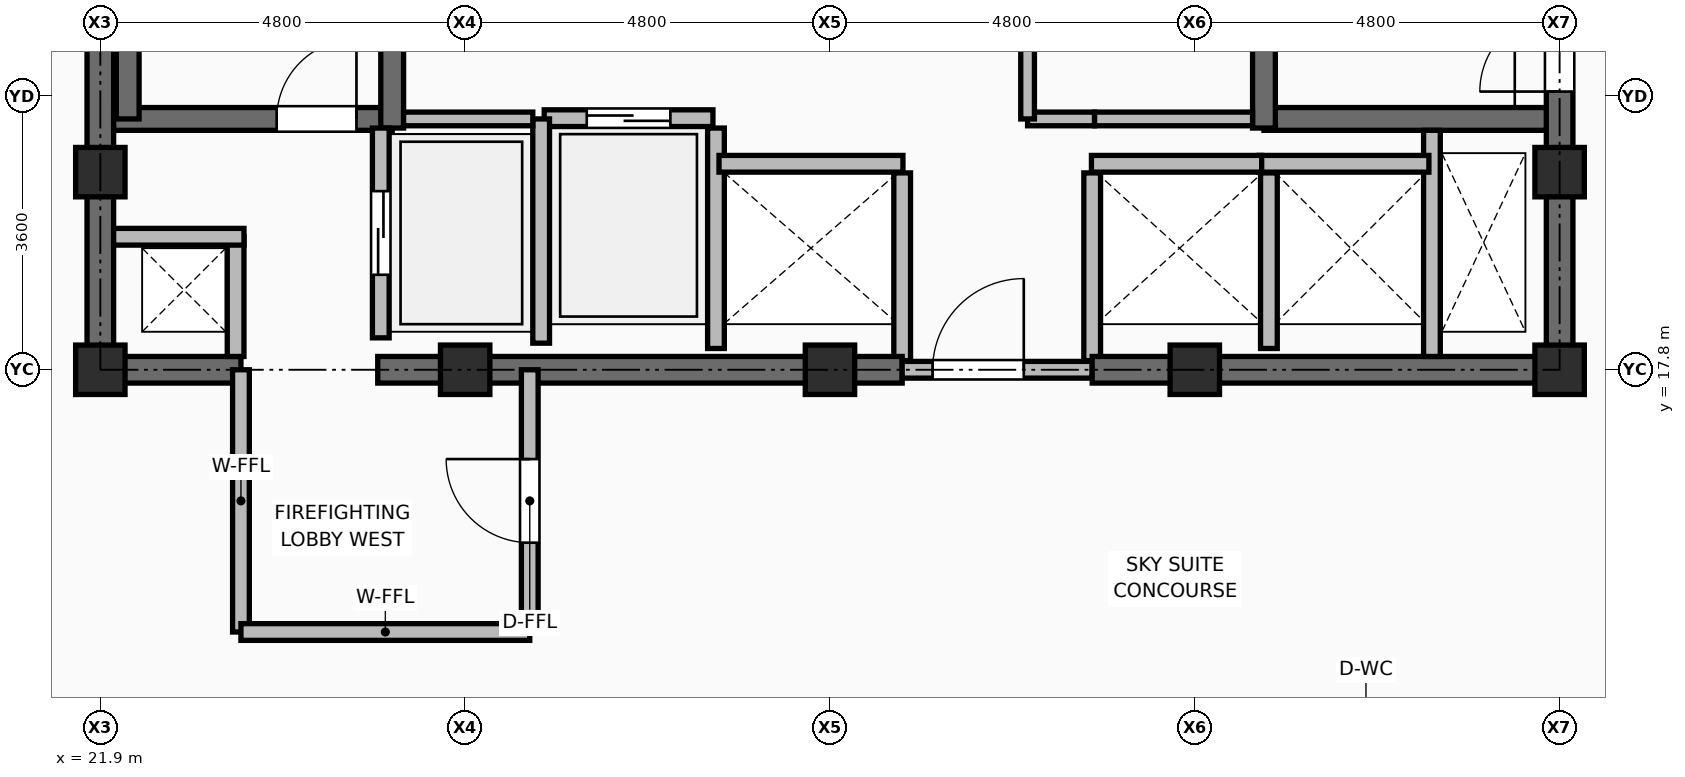
"""IFC4 building model, lengths in metres.
Left out: names, types, materials, properties, quantities, classifications, styles, units other than length and angle.
Written with IfcOpenShell. Run it as: python <this file> out.ifc"""

import sys

from ifc_helpers import new_model, si_unit, direction, frame, frame_2d, origin, origin_2d, place, context, subcontext, project, spatial, rectangle, extrude, element, fill, save


model = new_model("IFC4")
c1 = context("Model", 3, precision=1e-05, world=origin(), true_north=direction((0.0, 1.0)))
c2 = subcontext(c1, "Body", "Model", "MODEL_VIEW")
j1 = project(units=[si_unit("LENGTHUNIT", "METRE"), si_unit("PLANEANGLEUNIT", "RADIAN")], contexts=[c1])
p1 = place(None, origin())
s1 = spatial("IfcSite", under=j1, at=p1, CompositionType="ELEMENT")
p2 = place(p1, origin())
s2 = spatial("IfcBuilding", under=s1, at=p2, CompositionType="ELEMENT")
p3 = place(p2, frame((0.0, 0.0, 259.05)))
s3 = spatial("IfcBuildingStorey", under=s2, at=p3, CompositionType="ELEMENT", Elevation=259.05)
for number, where, z_axis, x_axis in (
    (1, (21.9, 17.8, 0.0), (0.0, 0.0, 1.0), (1.0, 0.0, 0.0)),
    (2, (26.7, 17.8, 0.0), (0.0, 0.0, 1.0), (1.0, 0.0, 0.0)),
    (3, (31.5, 17.8, 0.0), (0.0, 0.0, 1.0), (1.0, 0.0, 0.0)),
    (4, (36.3, 17.8, 0.0), (0.0, 0.0, 1.0), (1.0, 0.0, 0.0)),
    (5, (41.1, 17.8, 0.0), (0.0, 0.0, 1.0), (1.0, 0.0, 0.0)),
    (6, (21.9, 20.4, 0.0), (0.0, 0.0, 1.0), (1.0, 0.0, 0.0)),
    (7, (41.1, 20.4, 0.0), (0.0, 0.0, 1.0), (1.0, 0.0, 0.0)),
):
    element("IfcColumn", number, at=place(p3, frame(where, z_axis=z_axis, x_axis=x_axis)), inside=s3, PredefinedType="COLUMN", context=c2, shape_type="SweptSolid", body=[
        extrude(rectangle(XDim=0.65, YDim=0.65, at=origin_2d()), origin(), (0.0, 0.0, 1.0), 4.8),
    ])
p4 = place(p3, frame((30.0, 18.08, 0.0), z_axis=(0.0, 0.0, 1.0), x_axis=(0.0, 1.0, 0.0)))
e8 = element("IfcWall", 8, at=p4, inside=s3, PredefinedType="PARTITIONING", context=c2, shape_type="SweptSolid", body=[
    extrude(rectangle(XDim=2.9, YDim=0.22, at=frame_2d((1.45, 0.0))), origin(), (0.0, 0.0, 1.0), 4.595),
])
for number, where, z_axis, x_axis in (
    (9, (32.45, 17.92, 0.0), (0.0, 0.0, 1.0), (0.0, 1.0, 0.0)),
    (10, (34.95, 17.92, 0.0), (0.0, 0.0, 1.0), (0.0, 1.0, 0.0)),
):
    element("IfcWall", number, at=place(p3, frame(where, z_axis=z_axis, x_axis=x_axis)), inside=s3, PredefinedType="PARTITIONING", context=c2, shape_type="SweptSolid", body=[
        extrude(rectangle(XDim=2.47, YDim=0.22, at=frame_2d((1.235, 0.0))), origin(), (0.0, 0.0, 1.0), 4.595),
    ])
p5 = place(p3, frame((37.275, 18.08, 0.0), z_axis=(0.0, 0.0, 1.0), x_axis=(0.0, 1.0, 0.0)))
e11 = element("IfcWall", 11, at=p5, inside=s3, PredefinedType="PARTITIONING", context=c2, shape_type="SweptSolid", body=[
    extrude(rectangle(XDim=2.31, YDim=0.22, at=frame_2d((1.155, 0.0))), origin(), (0.0, 0.0, 1.0), 4.595),
])
p6 = place(p3, frame((21.725, 17.8, 0.0), z_axis=(0.0, 0.0, 1.0), x_axis=(1.0, 0.0, 0.0)))
e12 = element("IfcWall", 12, at=p6, inside=s3, PredefinedType="SHEAR", context=c2, shape_type="SweptSolid", body=[
    extrude(rectangle(XDim=2.025, YDim=0.35, at=frame_2d((1.012, 0.0))), origin(), (0.0, 0.0, 1.0), 4.62),
])
p7 = place(p3, frame((25.55, 17.8, 0.0), z_axis=(0.0, 0.0, 1.0), x_axis=(1.0, 0.0, 0.0)))
e13 = element("IfcWall", 13, at=p7, inside=s3, PredefinedType="SHEAR", context=c2, shape_type="SweptSolid", body=[
    extrude(rectangle(XDim=6.9, YDim=0.35, at=frame_2d((3.45, 0.0))), origin(), (0.0, 0.0, 1.0), 4.62),
])
p8 = place(p3, frame((32.45, 17.8, 0.0), z_axis=(0.0, 0.0, 1.0), x_axis=(1.0, 0.0, 0.0)))
e14 = element("IfcWall", 14, at=p8, inside=s3, PredefinedType="PARTITIONING", context=c2, shape_type="SweptSolid", body=[
    extrude(rectangle(XDim=2.5, YDim=0.22, at=frame_2d((1.25, 0.0))), origin(), (0.0, 0.0, 1.0), 4.182),
])
p9 = place(p8, frame((0.4, 0.0, 0.0)))
e15 = element("IfcOpeningElement", 15, at=p9, cuts=e14, PredefinedType="OPENING", context=c2, shape_type="SweptSolid", body=[
    extrude(rectangle(XDim=1.2, YDim=2.1, at=frame_2d((0.6, 1.05))), frame((0.0, 0.12, 0.0), z_axis=(0.0, -1.0, 0.0), x_axis=(1.0, 0.0, 0.0)), (0.0, 0.0, 1.0), 0.24),
])
p10 = place(p3, frame((34.95, 17.8, 0.0), z_axis=(0.0, 0.0, 1.0), x_axis=(1.0, 0.0, 0.0)))
e16 = element("IfcWall", 16, at=p10, inside=s3, PredefinedType="SHEAR", context=c2, shape_type="SweptSolid", body=[
    extrude(rectangle(XDim=6.325, YDim=0.35, at=frame_2d((3.163, 0.0))), origin(), (0.0, 0.0, 1.0), 4.62),
])
p11 = place(p3, frame((21.9, 17.975, 0.0), z_axis=(0.0, 0.0, 1.0), x_axis=(0.0, 1.0, 0.0)))
e17 = element("IfcWall", 17, at=p11, inside=s3, PredefinedType="SHEAR", context=c2, shape_type="SweptSolid", body=[
    extrude(rectangle(XDim=14.3, YDim=0.35, at=frame_2d((7.15, 0.0))), origin(), (0.0, 0.0, 1.0), 4.62),
])
p12 = place(p3, frame((41.1, 17.975, 0.0), z_axis=(0.0, 0.0, 1.0), x_axis=(0.0, 1.0, 0.0)))
e18 = element("IfcWall", 18, at=p12, inside=s3, PredefinedType="SHEAR", context=c2, shape_type="SweptSolid", body=[
    extrude(rectangle(XDim=14.3, YDim=0.35, at=frame_2d((7.15, 0.0))), origin(), (0.0, 0.0, 1.0), 4.62),
])
p13 = place(p12, frame((3.485, 0.0, 0.0)))
e19 = element("IfcOpeningElement", 19, at=p13, cuts=e18, PredefinedType="OPENING", context=c2, shape_type="SweptSolid", body=[
    extrude(rectangle(XDim=1.05, YDim=2.1, at=frame_2d((0.525, 1.05))), frame((0.0, 0.185, 0.0), z_axis=(0.0, -1.0, 0.0), x_axis=(1.0, 0.0, 0.0)), (0.0, 0.0, 1.0), 0.37),
])
p14 = place(p3, frame((22.075, 21.1, 0.0), z_axis=(0.0, 0.0, 1.0), x_axis=(1.0, 0.0, 0.0)))
e20 = element("IfcWall", 20, at=p14, inside=s3, PredefinedType="SHEAR", context=c2, shape_type="SweptSolid", body=[
    extrude(rectangle(XDim=3.665, YDim=0.3, at=frame_2d((1.833, 0.0))), origin(), (0.0, 0.0, 1.0), 4.62),
])
p15 = place(p14, frame((2.145, 0.0, 0.0)))
e21 = element("IfcOpeningElement", 21, at=p15, cuts=e20, PredefinedType="OPENING", context=c2, shape_type="SweptSolid", body=[
    extrude(rectangle(XDim=1.05, YDim=2.1, at=frame_2d((0.525, 1.05))), frame((0.0, 0.16, 0.0), z_axis=(0.0, -1.0, 0.0), x_axis=(1.0, 0.0, 0.0)), (0.0, 0.0, 1.0), 0.32),
])
p16 = place(p3, frame((25.74, 20.98, 0.0), z_axis=(0.0, 0.0, 1.0), x_axis=(0.0, 1.0, 0.0)))
e22 = element("IfcWall", 22, at=p16, inside=s3, PredefinedType="SHEAR", context=c2, shape_type="SweptSolid", body=[
    extrude(rectangle(XDim=7.99, YDim=0.3, at=frame_2d((3.995, 0.0))), origin(), (0.0, 0.0, 1.0), 4.62),
])
p17 = place(p3, frame((22.26, 21.1, 0.0), z_axis=(0.0, 0.0, 1.0), x_axis=(0.0, 1.0, 0.0)))
e23 = element("IfcWall", 23, at=p17, inside=s3, PredefinedType="SHEAR", context=c2, shape_type="SweptSolid", body=[
    extrude(rectangle(XDim=7.75, YDim=0.3, at=frame_2d((3.875, 0.0))), origin(), (0.0, 0.0, 1.0), 4.62),
])
p18 = place(p3, frame((37.21, 21.1, 0.0), z_axis=(0.0, 0.0, 1.0), x_axis=(1.0, 0.0, 0.0)))
e24 = element("IfcWall", 24, at=p18, inside=s3, PredefinedType="SHEAR", context=c2, shape_type="SweptSolid", body=[
    extrude(rectangle(XDim=3.715, YDim=0.3, at=frame_2d((1.857, 0.0))), origin(), (0.0, 0.0, 1.0), 4.62),
])
p19 = place(p3, frame((37.21, 20.98, 0.0), z_axis=(0.0, 0.0, 1.0), x_axis=(0.0, 1.0, 0.0)))
e25 = element("IfcWall", 25, at=p19, inside=s3, PredefinedType="SHEAR", context=c2, shape_type="SweptSolid", body=[
    extrude(rectangle(XDim=7.99, YDim=0.3, at=frame_2d((3.995, 0.0))), origin(), (0.0, 0.0, 1.0), 4.62),
])
p20 = place(p3, frame((23.68, 17.975, 0.0), z_axis=(0.0, 0.0, 1.0), x_axis=(0.0, 1.0, 0.0)))
e26 = element("IfcWall", 26, at=p20, inside=s3, PredefinedType="PARTITIONING", context=c2, shape_type="SweptSolid", body=[
    extrude(rectangle(XDim=1.575, YDim=0.22, at=frame_2d((0.788, 0.0))), origin(), (0.0, 0.0, 1.0), 4.182),
])
p21 = place(p3, frame((22.075, 19.55, 0.0), z_axis=(0.0, 0.0, 1.0), x_axis=(1.0, 0.0, 0.0)))
e27 = element("IfcWall", 27, at=p21, inside=s3, PredefinedType="PARTITIONING", context=c2, shape_type="SweptSolid", body=[
    extrude(rectangle(XDim=1.715, YDim=0.22, at=frame_2d((0.857, 0.0))), origin(), (0.0, 0.0, 1.0), 3.645),
])
p22 = place(p3, frame((39.42, 17.975, 0.0), z_axis=(0.0, 0.0, 1.0), x_axis=(0.0, 1.0, 0.0)))
e28 = element("IfcWall", 28, at=p22, inside=s3, PredefinedType="PARTITIONING", context=c2, shape_type="SweptSolid", body=[
    extrude(rectangle(XDim=2.975, YDim=0.22, at=frame_2d((1.487, 0.0))), origin(), (0.0, 0.0, 1.0), 4.182),
])
p23 = place(p3, frame((25.59, 18.22, 0.0), z_axis=(0.0, 0.0, 1.0), x_axis=(0.0, 1.0, 0.0)))
e29 = element("IfcWall", 29, at=p23, inside=s3, PredefinedType="PARTITIONING", context=c2, shape_type="SweptSolid", body=[
    extrude(rectangle(XDim=2.76, YDim=0.22, at=frame_2d((1.38, 0.0))), origin(), (0.0, 0.0, 1.0), 4.6),
])
p24 = place(p23, frame((0.83, 0.0, 0.0)))
e30 = element("IfcOpeningElement", 30, at=p24, cuts=e29, PredefinedType="OPENING", context=c2, shape_type="SweptSolid", body=[
    extrude(rectangle(XDim=1.1, YDim=2.2, at=frame_2d((0.55, 1.1))), frame((0.0, 0.12, 0.0), z_axis=(0.0, -1.0, 0.0), x_axis=(1.0, 0.0, 0.0)), (0.0, 0.0, 1.0), 0.24),
])
p25 = place(p3, frame((27.74, 21.11, 0.0), z_axis=(0.0, 0.0, 1.0), x_axis=(1.0, 0.0, 0.0)))
e31 = element("IfcWall", 31, at=p25, inside=s3, PredefinedType="PARTITIONING", context=c2, shape_type="SweptSolid", body=[
    extrude(rectangle(XDim=2.22, YDim=0.22, at=frame_2d((1.11, 0.0))), origin(), (0.0, 0.0, 1.0), 4.6),
])
p26 = place(p25, frame((0.56, 0.0, 0.0)))
e32 = element("IfcOpeningElement", 32, at=p26, cuts=e31, PredefinedType="OPENING", context=c2, shape_type="SweptSolid", body=[
    extrude(rectangle(XDim=1.1, YDim=2.2, at=frame_2d((0.55, 1.1))), frame((0.0, 0.12, 0.0), z_axis=(0.0, -1.0, 0.0), x_axis=(1.0, 0.0, 0.0)), (0.0, 0.0, 1.0), 0.24),
])
p27 = place(p3, frame((30.04, 20.51, 0.0), z_axis=(0.0, 0.0, 1.0), x_axis=(1.0, 0.0, 0.0)))
e33 = element("IfcWall", 33, at=p27, inside=s3, PredefinedType="PARTITIONING", context=c2, shape_type="SweptSolid", body=[
    extrude(rectangle(XDim=2.42, YDim=0.22, at=frame_2d((1.21, 0.0))), origin(), (0.0, 0.0, 1.0), 4.6),
])
for number, where, z_axis, x_axis in (
    (34, (37.14, 20.51, 0.0), (0.0, 0.0, 1.0), (1.0, 0.0, 0.0)),
    (35, (34.94, 20.51, 0.0), (0.0, 0.0, 1.0), (1.0, 0.0, 0.0)),
):
    element("IfcWall", number, at=place(p3, frame(where, z_axis=z_axis, x_axis=x_axis)), inside=s3, PredefinedType="PARTITIONING", context=c2, shape_type="SweptSolid", body=[
        extrude(rectangle(XDim=2.24, YDim=0.22, at=frame_2d((1.12, 0.0))), origin(), (0.0, 0.0, 1.0), 4.6),
    ])
p28 = place(p3, frame((27.7, 18.15, 0.0), z_axis=(0.0, 0.0, 1.0), x_axis=(0.0, 1.0, 0.0)))
e36 = element("IfcWall", 36, at=p28, inside=s3, PredefinedType="PARTITIONING", context=c2, shape_type="SweptSolid", body=[
    extrude(rectangle(XDim=2.95, YDim=0.22, at=frame_2d((1.475, 0.0))), origin(), (0.0, 0.0, 1.0), 4.6),
])
p29 = place(p3, frame((25.89, 21.1, 0.0), z_axis=(0.0, 0.0, 1.0), x_axis=(1.0, 0.0, 0.0)))
e37 = element("IfcWall", 37, at=p29, inside=s3, PredefinedType="PARTITIONING", context=c2, shape_type="SweptSolid", body=[
    extrude(rectangle(XDim=1.7, YDim=0.18, at=frame_2d((0.85, 0.0))), origin(), (0.0, 0.0, 1.0), 4.6),
])
p30 = place(p3, frame((34.98, 21.1, 0.0), z_axis=(0.0, 0.0, 1.0), x_axis=(1.0, 0.0, 0.0)))
e38 = element("IfcWall", 38, at=p30, inside=s3, PredefinedType="PARTITIONING", context=c2, shape_type="SweptSolid", body=[
    extrude(rectangle(XDim=2.08, YDim=0.18, at=frame_2d((1.04, 0.0))), origin(), (0.0, 0.0, 1.0), 4.6),
])
p31 = place(p3, frame((34.1, 21.1, 0.0), z_axis=(0.0, 0.0, 1.0), x_axis=(1.0, 0.0, 0.0)))
e39 = element("IfcWall", 39, at=p31, inside=s3, PredefinedType="PARTITIONING", context=c2, shape_type="SweptSolid", body=[
    extrude(rectangle(XDim=0.88, YDim=0.18, at=frame_2d((0.44, 0.0))), origin(), (0.0, 0.0, 1.0), 4.6),
])
p32 = place(p3, frame((34.1, 21.1, 0.0), z_axis=(0.0, 0.0, 1.0), x_axis=(0.0, 1.0, 0.0)))
e40 = element("IfcWall", 40, at=p32, inside=s3, PredefinedType="PARTITIONING", context=c2, shape_type="SweptSolid", body=[
    extrude(rectangle(XDim=4.55, YDim=0.18, at=frame_2d((2.275, 0.0))), origin(), (0.0, 0.0, 1.0), 4.6),
])
p33 = place(p32, frame((1.825, 0.0, 0.0)))
e41 = element("IfcOpeningElement", 41, at=p33, cuts=e40, PredefinedType="OPENING", context=c2, shape_type="SweptSolid", body=[
    extrude(rectangle(XDim=0.9, YDim=2.1, at=frame_2d((0.45, 1.05))), frame((0.0, 0.1, 0.0), z_axis=(0.0, -1.0, 0.0), x_axis=(1.0, 0.0, 0.0)), (0.0, 0.0, 1.0), 0.2),
])
p34 = place(p3, frame((23.75, 14.35, 0.0), z_axis=(0.0, 0.0, 1.0), x_axis=(0.0, 1.0, 0.0)))
e42 = element("IfcWall", 42, at=p34, inside=s3, PredefinedType="PARTITIONING", context=c2, shape_type="SweptSolid", body=[
    extrude(rectangle(XDim=3.45, YDim=0.22, at=frame_2d((1.725, 0.0))), origin(), (0.0, 0.0, 1.0), 4.182),
])
p35 = place(p3, frame((23.75, 14.35, 0.0), z_axis=(0.0, 0.0, 1.0), x_axis=(1.0, 0.0, 0.0)))
e43 = element("IfcWall", 43, at=p35, inside=s3, PredefinedType="PARTITIONING", context=c2, shape_type="SweptSolid", body=[
    extrude(rectangle(XDim=3.8, YDim=0.22, at=frame_2d((1.9, 0.0))), origin(), (0.0, 0.0, 1.0), 4.6),
])
p36 = place(p3, frame((27.55, 14.35, 0.0), z_axis=(0.0, 0.0, 1.0), x_axis=(0.0, 1.0, 0.0)))
e44 = element("IfcWall", 44, at=p36, inside=s3, PredefinedType="PARTITIONING", context=c2, shape_type="SweptSolid", body=[
    extrude(rectangle(XDim=3.45, YDim=0.22, at=frame_2d((1.725, 0.0))), origin(), (0.0, 0.0, 1.0), 4.182),
])
p37 = place(p36, frame((1.175, 0.0, 0.0)))
e45 = element("IfcOpeningElement", 45, at=p37, cuts=e44, PredefinedType="OPENING", context=c2, shape_type="SweptSolid", body=[
    extrude(rectangle(XDim=1.1, YDim=2.1, at=frame_2d((0.55, 1.05))), frame((0.0, 0.12, 0.0), z_axis=(0.0, -1.0, 0.0), x_axis=(1.0, 0.0, 0.0)), (0.0, 0.0, 1.0), 0.24),
])
p38 = place(p9, origin())
e46 = element("IfcDoor", 46, at=p38, inside=s3, OperationType="SINGLE_SWING_RIGHT", PredefinedType="DOOR", context=c2, shape_type="SweptSolid", body=[
    extrude(rectangle(XDim=1.2, YDim=2.1, at=frame_2d((0.6, 1.05))), frame((0.0, 0.025, 0.0), z_axis=(0.0, -1.0, 0.0), x_axis=(1.0, 0.0, 0.0)), (0.0, 0.0, 1.0), 0.05),
])
fill(e15, e46)
p39 = place(p15, origin())
e47 = element("IfcDoor", 47, at=p39, inside=s3, OperationType="SINGLE_SWING_RIGHT", PredefinedType="DOOR", context=c2, shape_type="SweptSolid", body=[
    extrude(rectangle(XDim=1.05, YDim=2.1, at=frame_2d((0.525, 1.05))), frame((0.0, 0.025, 0.0), z_axis=(0.0, -1.0, 0.0), x_axis=(1.0, 0.0, 0.0)), (0.0, 0.0, 1.0), 0.05),
])
fill(e21, e47)
p40 = place(p13, origin())
e48 = element("IfcDoor", 48, at=p40, inside=s3, OperationType="SINGLE_SWING_LEFT", PredefinedType="DOOR", context=c2, shape_type="SweptSolid", body=[
    extrude(rectangle(XDim=1.05, YDim=2.1, at=frame_2d((0.525, 1.05))), frame((0.0, 0.025, 0.0), z_axis=(0.0, -1.0, 0.0), x_axis=(1.0, 0.0, 0.0)), (0.0, 0.0, 1.0), 0.05),
])
fill(e19, e48)
p41 = place(p24, origin())
e49 = element("IfcDoor", 49, at=p41, inside=s3, OperationType="DOUBLE_DOOR_SLIDING", PredefinedType="DOOR", context=c2, shape_type="SweptSolid", body=[
    extrude(rectangle(XDim=1.1, YDim=2.2, at=frame_2d((0.55, 1.1))), frame((0.0, 0.025, 0.0), z_axis=(0.0, -1.0, 0.0), x_axis=(1.0, 0.0, 0.0)), (0.0, 0.0, 1.0), 0.05),
])
fill(e30, e49)
p42 = place(p26, origin())
e50 = element("IfcDoor", 50, at=p42, inside=s3, OperationType="DOUBLE_DOOR_SLIDING", PredefinedType="DOOR", context=c2, shape_type="SweptSolid", body=[
    extrude(rectangle(XDim=1.1, YDim=2.2, at=frame_2d((0.55, 1.1))), frame((0.0, 0.025, 0.0), z_axis=(0.0, -1.0, 0.0), x_axis=(1.0, 0.0, 0.0)), (0.0, 0.0, 1.0), 0.05),
])
fill(e32, e50)
p43 = place(p37, origin())
e51 = element("IfcDoor", 51, at=p43, inside=s3, OperationType="SINGLE_SWING_RIGHT", PredefinedType="DOOR", context=c2, shape_type="SweptSolid", body=[
    extrude(rectangle(XDim=1.1, YDim=2.1, at=frame_2d((0.55, 1.05))), frame((0.0, 0.025, 0.0), z_axis=(0.0, -1.0, 0.0), x_axis=(1.0, 0.0, 0.0)), (0.0, 0.0, 1.0), 0.05),
])
fill(e45, e51)
save(model, sys.argv[1])
